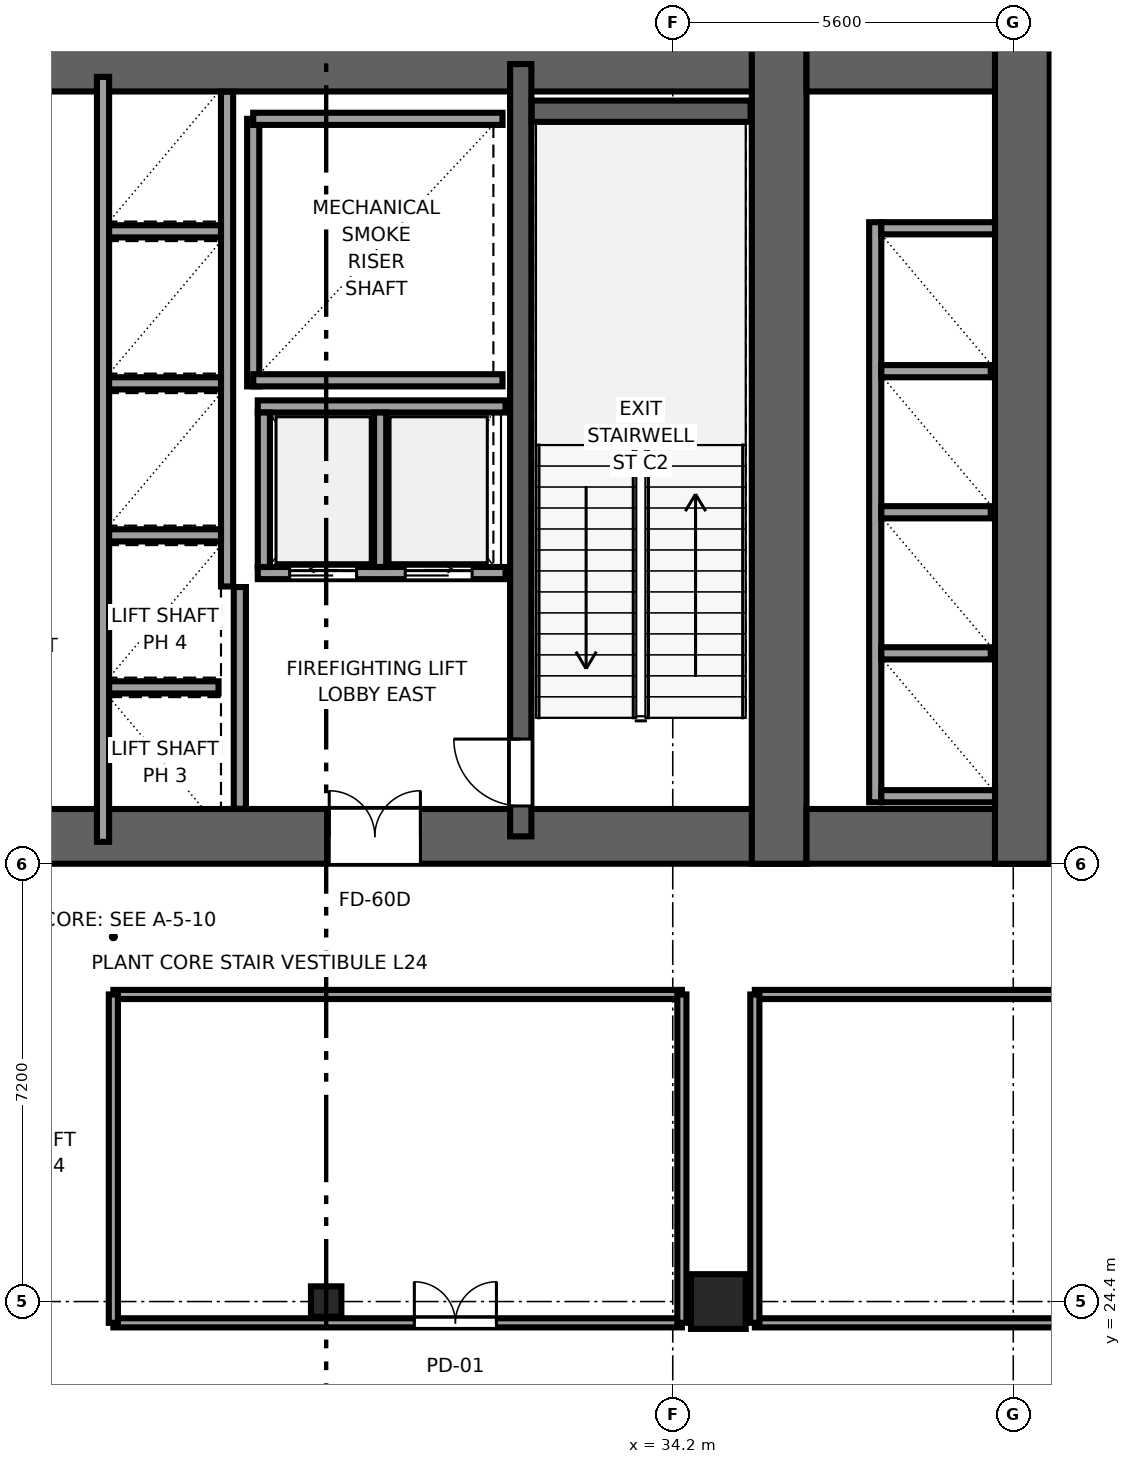
"""IFC4 building model, lengths in metres.
Left out: names, types, materials, properties, quantities, classifications, styles, units other than length and angle.
Written with IfcOpenShell. Run it as: python <this file> out.ifc"""

import sys

from ifc_helpers import new_model, si_unit, direction, frame, frame_2d, origin, origin_2d, place, context, subcontext, project, spatial, rectangle, i_section, extrude, source, transform, mapped, element, fill, save


model = new_model("IFC4")
c1 = context("Model", 3, precision=1e-05, world=origin(), true_north=direction((0.0, 1.0)))
c2 = subcontext(c1, "Body", "Model", "MODEL_VIEW")
j1 = project(units=[si_unit("LENGTHUNIT", "METRE"), si_unit("PLANEANGLEUNIT", "RADIAN")], contexts=[c1])
p1 = place(None, origin())
s1 = spatial("IfcSite", under=j1, at=p1, CompositionType="ELEMENT")
p2 = place(p1, origin())
s2 = spatial("IfcBuilding", under=s1, at=p2, CompositionType="ELEMENT")
p3 = place(p2, frame((0.0, 0.0, 95.9)))
s3 = spatial("IfcBuildingStorey", under=s2, at=p3, CompositionType="ELEMENT", Elevation=95.9)
p4 = place(p3, frame((9.6, 32.05, 0.0), z_axis=(0.0, 0.0, 1.0), x_axis=(1.0, 0.0, 0.0)))
e1 = element("IfcWall", 1, at=p4, inside=s3, PredefinedType="SHEAR", context=c2, shape_type="SweptSolid", body=[
    extrude(rectangle(XDim=26.8, YDim=0.9, at=frame_2d((13.4, 0.0))), origin(), (0.0, 0.0, 1.0), 5.0),
])
p5 = place(p4, frame((7.85, 0.0, 0.0), z_axis=(0.0, 0.0, 1.0), x_axis=(-1.0, 0.0, 0.0)))
e2 = element("IfcOpeningElement", 2, at=p5, cuts=e1, PredefinedType="OPENING", context=c2, shape_type="SweptSolid", body=[
    extrude(rectangle(XDim=1.5, YDim=2.04, at=frame_2d((0.75, 1.02))), frame((0.0, 0.46, 0.0), z_axis=(0.0, -1.0, 0.0), x_axis=(1.0, 0.0, 0.0)), (0.0, 0.0, 1.0), 0.92),
])
p6 = place(p4, frame((14.15, 0.0, 0.0), z_axis=(0.0, 0.0, 1.0), x_axis=(-1.0, 0.0, 0.0)))
e3 = element("IfcOpeningElement", 3, at=p6, cuts=e1, PredefinedType="OPENING", context=c2, shape_type="SweptSolid", body=[
    extrude(rectangle(XDim=1.5, YDim=2.04, at=frame_2d((0.75, 1.02))), frame((0.0, 0.46, 0.0), z_axis=(0.0, -1.0, 0.0), x_axis=(1.0, 0.0, 0.0)), (0.0, 0.0, 1.0), 0.92),
])
p7 = place(p4, frame((20.45, 0.0, 0.0), z_axis=(0.0, 0.0, 1.0), x_axis=(-1.0, 0.0, 0.0)))
e4 = element("IfcOpeningElement", 4, at=p7, cuts=e1, PredefinedType="OPENING", context=c2, shape_type="SweptSolid", body=[
    extrude(rectangle(XDim=1.5, YDim=2.04, at=frame_2d((0.75, 1.02))), frame((0.0, 0.46, 0.0), z_axis=(0.0, -1.0, 0.0), x_axis=(1.0, 0.0, 0.0)), (0.0, 0.0, 1.0), 0.92),
])
p8 = place(p3, frame((9.6, 44.75, 0.0), z_axis=(0.0, 0.0, 1.0), x_axis=(1.0, 0.0, 0.0)))
e5 = element("IfcWall", 5, at=p8, inside=s3, PredefinedType="SHEAR", context=c2, shape_type="SweptSolid", body=[
    extrude(rectangle(XDim=26.8, YDim=0.9, at=frame_2d((13.4, 0.0))), origin(), (0.0, 0.0, 1.0), 5.0),
])
p9 = place(p3, frame((35.95, 31.6, 0.0), z_axis=(0.0, 0.0, 1.0), x_axis=(0.0, 1.0, 0.0)))
e6 = element("IfcWall", 6, at=p9, inside=s3, PredefinedType="SHEAR", context=c2, shape_type="SweptSolid", body=[
    extrude(rectangle(XDim=13.6, YDim=0.9, at=frame_2d((6.8, 0.0))), origin(), (0.0, 0.0, 1.0), 5.0),
])
p10 = place(p3, frame((31.7, 32.05, 0.0), z_axis=(0.0, 0.0, 1.0), x_axis=(0.0, 1.0, 0.0)))
e7 = element("IfcWall", 7, at=p10, inside=s3, PredefinedType="SHEAR", context=c2, shape_type="SweptSolid", body=[
    extrude(rectangle(XDim=12.7, YDim=0.35, at=frame_2d((6.35, 0.0))), origin(), (0.0, 0.0, 1.0), 5.0),
])
p11 = place(p10, frame((1.6, 0.0, 0.0), z_axis=(0.0, 0.0, 1.0), x_axis=(-1.0, 0.0, 0.0)))
e8 = element("IfcOpeningElement", 8, at=p11, cuts=e7, PredefinedType="OPENING", context=c2, shape_type="SweptSolid", body=[
    extrude(rectangle(XDim=1.1, YDim=2.12, at=frame_2d((0.55, 1.06))), frame((0.0, 0.185, 0.0), z_axis=(0.0, -1.0, 0.0), x_axis=(1.0, 0.0, 0.0)), (0.0, 0.0, 1.0), 0.37),
])
for number, where, z_axis, x_axis in (
    (9, (36.4, 32.05, 0.0), (0.0, 0.0, 1.0), (1.0, 0.0, 0.0)),
    (10, (36.4, 44.75, 0.0), (0.0, 0.0, 1.0), (1.0, 0.0, 0.0)),
):
    element("IfcWall", number, at=place(p3, frame(where, z_axis=z_axis, x_axis=x_axis)), inside=s3, PredefinedType="SHEAR", context=c2, shape_type="SweptSolid", body=[
        extrude(rectangle(XDim=4.0, YDim=0.9, at=frame_2d((2.0, 0.0))), origin(), (0.0, 0.0, 1.0), 5.0),
    ])
p12 = place(p3, frame((39.95, 31.6, 0.0), z_axis=(0.0, 0.0, 1.0), x_axis=(0.0, 1.0, 0.0)))
e11 = element("IfcWall", 11, at=p12, inside=s3, PredefinedType="SHEAR", context=c2, shape_type="SweptSolid", body=[
    extrude(rectangle(XDim=13.6, YDim=0.9, at=frame_2d((6.8, 0.0))), origin(), (0.0, 0.0, 1.0), 5.0),
])
p13 = place(p3, frame((31.88, 43.975, 0.0), z_axis=(0.0, 0.0, 1.0), x_axis=(1.0, 0.0, 0.0)))
e12 = element("IfcWall", 12, at=p13, inside=s3, PredefinedType="SHEAR", context=c2, shape_type="SweptSolid", body=[
    extrude(rectangle(XDim=3.6, YDim=0.35, at=frame_2d((1.8, 0.0))), origin(), (0.0, 0.0, 1.0), 5.0),
])
m1 = source(origin(), c2, "Body", "SweptSolid", [
    extrude(rectangle(XDim=0.9, YDim=0.9, at=origin_2d()), origin(), (0.0, 0.0, 1.0), 5.0),
])
p14 = place(p3, frame((34.95, 24.4, 0.0), z_axis=(0.0, 0.0, 1.0), x_axis=(1.0, 0.0, 0.0)))
e13 = element("IfcColumn", 13, at=p14, inside=s3, PredefinedType="COLUMN", context=c2, shape_type="MappedRepresentation", body=[
    mapped(m1, transform((0.0, 0.0, 0.0), x_axis=(1.0, 0.0, 0.0), y_axis=(0.0, 1.0, 0.0), z_axis=(0.0, 0.0, 1.0), scale=1.0)),
])
m2 = source(origin(), c2, "Body", "SweptSolid", [
    extrude(i_section(OverallWidth=0.5, OverallDepth=0.5, WebThickness=0.022, FlangeThickness=0.034, at=origin_2d()), origin(), (0.0, 0.0, 1.0), 5.0),
])
p15 = place(p3, frame((28.5, 24.4, 0.0), z_axis=(0.0, 0.0, 1.0), x_axis=(1.0, 0.0, 0.0)))
e14 = element("IfcColumn", 14, at=p15, inside=s3, PredefinedType="COLUMN", context=c2, shape_type="MappedRepresentation", body=[
    mapped(m2, transform((0.0, 0.0, 0.0), x_axis=(1.0, 0.0, 0.0), y_axis=(0.0, 1.0, 0.0), z_axis=(0.0, 0.0, 1.0), scale=1.0)),
])
p16 = place(p3, frame((27.3, 39.45, 0.0), z_axis=(0.0, 0.0, 1.0), x_axis=(0.0, 1.0, 0.0)))
e15 = element("IfcWall", 15, at=p16, inside=s3, PredefinedType="SOLIDWALL", context=c2, shape_type="SweptSolid", body=[
    extrude(rectangle(XDim=4.4, YDim=0.2, at=frame_2d((2.2, 0.0))), origin(), (0.0, 0.0, 1.0), 4.82),
])
for number, where, z_axis, x_axis in (
    (16, (27.3, 39.55, 0.0), (0.0, 0.0, 1.0), (1.0, 0.0, 0.0)),
    (17, (27.3, 43.85, 0.0), (0.0, 0.0, 1.0), (1.0, 0.0, 0.0)),
):
    element("IfcWall", number, at=place(p3, frame(where, z_axis=z_axis, x_axis=x_axis)), inside=s3, PredefinedType="SOLIDWALL", context=c2, shape_type="SweptSolid", body=[
        extrude(rectangle(XDim=4.1, YDim=0.2, at=frame_2d((2.05, 0.0))), origin(), (0.0, 0.0, 1.0), 4.82),
    ])
p17 = place(p3, frame((27.08, 32.504, 0.0), z_axis=(0.0, 0.0, 1.0), x_axis=(0.0, 1.0, 0.0)))
e18 = element("IfcWall", 18, at=p17, inside=s3, PredefinedType="SOLIDWALL", context=c2, shape_type="SweptSolid", body=[
    extrude(rectangle(XDim=3.646, YDim=0.2, at=frame_2d((1.823, 0.0))), origin(), (0.0, 0.0, 1.0), 4.82),
])
p18 = place(p3, frame((27.375, 36.38, 0.0), z_axis=(0.0, 0.0, 1.0), x_axis=(1.0, 0.0, 0.0)))
e19 = element("IfcWall", 19, at=p18, inside=s3, PredefinedType="SOLIDWALL", context=c2, shape_type="SweptSolid", body=[
    extrude(rectangle(XDim=4.075, YDim=0.2, at=frame_2d((2.038, 0.0))), origin(), (0.0, 0.0, 1.0), 4.82),
])
p19 = place(p18, frame((0.525, 0.0, 0.0)))
e20 = element("IfcOpeningElement", 20, at=p19, cuts=e19, PredefinedType="OPENING", context=c2, shape_type="SweptSolid", body=[
    extrude(rectangle(XDim=1.1, YDim=2.12, at=frame_2d((0.55, 1.06))), frame((0.0, 0.11, 0.0), z_axis=(0.0, -1.0, 0.0), x_axis=(1.0, 0.0, 0.0)), (0.0, 0.0, 1.0), 0.22),
])
p20 = place(p18, frame((2.425, 0.0, 0.0)))
e21 = element("IfcOpeningElement", 21, at=p20, cuts=e19, PredefinedType="OPENING", context=c2, shape_type="SweptSolid", body=[
    extrude(rectangle(XDim=1.1, YDim=2.12, at=frame_2d((0.55, 1.06))), frame((0.0, 0.11, 0.0), z_axis=(0.0, -1.0, 0.0), x_axis=(1.0, 0.0, 0.0)), (0.0, 0.0, 1.0), 0.22),
])
p21 = place(p3, frame((27.375, 39.12, 0.0), z_axis=(0.0, 0.0, 1.0), x_axis=(1.0, 0.0, 0.0)))
e22 = element("IfcWall", 22, at=p21, inside=s3, PredefinedType="SOLIDWALL", context=c2, shape_type="SweptSolid", body=[
    extrude(rectangle(XDim=4.075, YDim=0.2, at=frame_2d((2.038, 0.0))), origin(), (0.0, 0.0, 1.0), 4.82),
])
for number, where, z_axis, x_axis in (
    (23, (27.475, 36.48, 0.0), (0.0, 0.0, 1.0), (0.0, 1.0, 0.0)),
    (24, (29.387, 36.48, 0.0), (0.0, 0.0, 1.0), (0.0, 1.0, 0.0)),
):
    element("IfcWall", number, at=place(p3, frame(where, z_axis=z_axis, x_axis=x_axis)), inside=s3, PredefinedType="SOLIDWALL", context=c2, shape_type="SweptSolid", body=[
        extrude(rectangle(XDim=2.54, YDim=0.2, at=frame_2d((1.27, 0.0))), origin(), (0.0, 0.0, 1.0), 4.82),
    ])
p22 = place(p3, frame((24.83, 31.96, 0.0), z_axis=(0.0, 0.0, 1.0), x_axis=(0.0, 1.0, 0.0)))
e25 = element("IfcWall", 25, at=p22, inside=s3, PredefinedType="SOLIDWALL", context=c2, shape_type="SweptSolid", body=[
    extrude(rectangle(XDim=12.58, YDim=0.2, at=frame_2d((6.29, 0.0))), origin(), (0.0, 0.0, 1.0), 4.82),
])
p23 = place(p3, frame((26.87, 36.16, 0.0), z_axis=(0.0, 0.0, 1.0), x_axis=(0.0, 1.0, 0.0)))
e26 = element("IfcWall", 26, at=p23, inside=s3, PredefinedType="SOLIDWALL", context=c2, shape_type="SweptSolid", body=[
    extrude(rectangle(XDim=8.136, YDim=0.2, at=frame_2d((4.068, 0.0))), origin(), (0.0, 0.0, 1.0), 4.82),
])
p24 = place(p3, frame((24.93, 34.5, 0.0), z_axis=(0.0, 0.0, 1.0), x_axis=(1.0, 0.0, 0.0)))
e27 = element("IfcWall", 27, at=p24, inside=s3, PredefinedType="SOLIDWALL", context=c2, shape_type="SweptSolid", body=[
    extrude(rectangle(XDim=1.8, YDim=0.2, at=frame_2d((0.9, 0.0))), origin(), (0.0, 0.0, 1.0), 4.82),
])
for number, where, z_axis, x_axis in (
    (28, (24.93, 37.0, 0.0), (0.0, 0.0, 1.0), (1.0, 0.0, 0.0)),
    (29, (24.93, 39.5, 0.0), (0.0, 0.0, 1.0), (1.0, 0.0, 0.0)),
    (30, (24.93, 42.0, 0.0), (0.0, 0.0, 1.0), (1.0, 0.0, 0.0)),
):
    element("IfcWall", number, at=place(p3, frame(where, z_axis=z_axis, x_axis=x_axis)), inside=s3, PredefinedType="SOLIDWALL", context=c2, shape_type="SweptSolid", body=[
        extrude(rectangle(XDim=1.84, YDim=0.2, at=frame_2d((0.92, 0.0))), origin(), (0.0, 0.0, 1.0), 4.82),
    ])
p25 = place(p3, frame((37.53, 32.61, 0.0), z_axis=(0.0, 0.0, 1.0), x_axis=(0.0, 1.0, 0.0)))
e31 = element("IfcWall", 31, at=p25, inside=s3, PredefinedType="SOLIDWALL", context=c2, shape_type="SweptSolid", body=[
    extrude(rectangle(XDim=9.54, YDim=0.2, at=frame_2d((4.77, 0.0))), origin(), (0.0, 0.0, 1.0), 4.82),
])
for number, where, z_axis, x_axis in (
    (32, (37.63, 32.71, 0.0), (0.0, 0.0, 1.0), (1.0, 0.0, 0.0)),
    (33, (37.63, 42.05, 0.0), (0.0, 0.0, 1.0), (1.0, 0.0, 0.0)),
):
    element("IfcWall", number, at=place(p3, frame(where, z_axis=z_axis, x_axis=x_axis)), inside=s3, PredefinedType="SOLIDWALL", context=c2, shape_type="SweptSolid", body=[
        extrude(rectangle(XDim=1.87, YDim=0.2, at=frame_2d((0.935, 0.0))), origin(), (0.0, 0.0, 1.0), 4.82),
    ])
for number, where, z_axis, x_axis in (
    (34, (37.63, 35.06, 0.0), (0.0, 0.0, 1.0), (1.0, 0.0, 0.0)),
    (35, (37.63, 37.38, 0.0), (0.0, 0.0, 1.0), (1.0, 0.0, 0.0)),
    (36, (37.63, 39.7, 0.0), (0.0, 0.0, 1.0), (1.0, 0.0, 0.0)),
):
    element("IfcWall", number, at=place(p3, frame(where, z_axis=z_axis, x_axis=x_axis)), inside=s3, PredefinedType="SOLIDWALL", context=c2, shape_type="SweptSolid", body=[
        extrude(rectangle(XDim=1.8, YDim=0.2, at=frame_2d((0.9, 0.0))), origin(), (0.0, 0.0, 1.0), 4.82),
    ])
p26 = place(p3, frame((25.0, 24.05, 0.0), z_axis=(0.0, 0.0, 1.0), x_axis=(1.0, 0.0, 0.0)))
e37 = element("IfcWall", 37, at=p26, inside=s3, PredefinedType="PARTITIONING", context=c2, shape_type="SweptSolid", body=[
    extrude(rectangle(XDim=9.35, YDim=0.15, at=frame_2d((4.675, 0.0))), origin(), (0.0, 0.0, 1.0), 4.82),
])
p27 = place(p26, frame((4.95, 0.0, 0.0)))
e38 = element("IfcOpeningElement", 38, at=p27, cuts=e37, PredefinedType="OPENING", context=c2, shape_type="SweptSolid", body=[
    extrude(rectangle(XDim=1.35, YDim=2.15, at=frame_2d((0.675, 1.075))), frame((0.0, 0.085, 0.0), z_axis=(0.0, -1.0, 0.0), x_axis=(1.0, 0.0, 0.0)), (0.0, 0.0, 1.0), 0.17),
])
p28 = place(p3, frame((25.0, 29.45, 0.0), z_axis=(0.0, 0.0, 1.0), x_axis=(1.0, 0.0, 0.0)))
e39 = element("IfcWall", 39, at=p28, inside=s3, PredefinedType="PARTITIONING", context=c2, shape_type="SweptSolid", body=[
    extrude(rectangle(XDim=9.35, YDim=0.15, at=frame_2d((4.675, 0.0))), origin(), (0.0, 0.0, 1.0), 4.82),
])
for number, where, z_axis, x_axis in (
    (40, (25.0, 24.05, 0.0), (0.0, 0.0, 1.0), (0.0, 1.0, 0.0)),
    (41, (34.35, 24.05, 0.0), (0.0, 0.0, 1.0), (0.0, 1.0, 0.0)),
):
    element("IfcWall", number, at=place(p3, frame(where, z_axis=z_axis, x_axis=x_axis)), inside=s3, PredefinedType="PARTITIONING", context=c2, shape_type="SweptSolid", body=[
        extrude(rectangle(XDim=5.4, YDim=0.15, at=frame_2d((2.7, 0.0))), origin(), (0.0, 0.0, 1.0), 4.82),
    ])
p29 = place(p3, frame((35.55, 24.05, 0.0), z_axis=(0.0, 0.0, 1.0), x_axis=(1.0, 0.0, 0.0)))
e42 = element("IfcWall", 42, at=p29, inside=s3, PredefinedType="PARTITIONING", context=c2, shape_type="SweptSolid", body=[
    extrude(rectangle(XDim=20.05, YDim=0.15, at=frame_2d((10.025, 0.0))), origin(), (0.0, 0.0, 1.0), 4.82),
])
p30 = place(p29, frame((9.35, 0.0, 0.0)))
e43 = element("IfcOpeningElement", 43, at=p30, cuts=e42, PredefinedType="OPENING", context=c2, shape_type="SweptSolid", body=[
    extrude(rectangle(XDim=1.35, YDim=2.15, at=frame_2d((0.675, 1.075))), frame((0.0, 0.085, 0.0), z_axis=(0.0, -1.0, 0.0), x_axis=(1.0, 0.0, 0.0)), (0.0, 0.0, 1.0), 0.17),
])
p31 = place(p3, frame((35.55, 29.45, 0.0), z_axis=(0.0, 0.0, 1.0), x_axis=(1.0, 0.0, 0.0)))
e44 = element("IfcWall", 44, at=p31, inside=s3, PredefinedType="PARTITIONING", context=c2, shape_type="SweptSolid", body=[
    extrude(rectangle(XDim=20.05, YDim=0.15, at=frame_2d((10.025, 0.0))), origin(), (0.0, 0.0, 1.0), 4.82),
])
p32 = place(p3, frame((35.55, 24.05, 0.0), z_axis=(0.0, 0.0, 1.0), x_axis=(0.0, 1.0, 0.0)))
e45 = element("IfcWall", 45, at=p32, inside=s3, PredefinedType="PARTITIONING", context=c2, shape_type="SweptSolid", body=[
    extrude(rectangle(XDim=5.4, YDim=0.15, at=frame_2d((2.7, 0.0))), origin(), (0.0, 0.0, 1.0), 4.82),
])
m3 = source(origin(), c2, "Body", "SweptSolid", [
    extrude(rectangle(XDim=1.1, YDim=2.12, at=frame_2d((0.55, 1.06))), frame((0.0, 0.025, 0.0), z_axis=(0.0, -1.0, 0.0), x_axis=(1.0, 0.0, 0.0)), (0.0, 0.0, 1.0), 0.05),
])
p33 = place(p11, origin())
e46 = element("IfcDoor", 46, at=p33, inside=s3, OperationType="SINGLE_SWING_RIGHT", PredefinedType="DOOR", context=c2, shape_type="MappedRepresentation", body=[
    mapped(m3, transform((0.0, 0.0, 0.0), x_axis=(1.0, 0.0, 0.0), y_axis=(0.0, 1.0, 0.0), z_axis=(0.0, 0.0, 1.0), scale=1.0)),
])
fill(e8, e46)
m4 = source(origin(), c2, "Body", "SweptSolid", [
    extrude(rectangle(XDim=1.5, YDim=2.04, at=frame_2d((0.75, 1.02))), frame((0.0, 0.025, 0.0), z_axis=(0.0, -1.0, 0.0), x_axis=(1.0, 0.0, 0.0)), (0.0, 0.0, 1.0), 0.05),
])
p34 = place(p7, origin())
e47 = element("IfcDoor", 47, at=p34, inside=s3, OperationType="DOUBLE_DOOR_SINGLE_SWING", PredefinedType="DOOR", context=c2, shape_type="MappedRepresentation", body=[
    mapped(m4, transform((0.0, 0.0, 0.0), x_axis=(1.0, 0.0, 0.0), y_axis=(0.0, 1.0, 0.0), z_axis=(0.0, 0.0, 1.0), scale=1.0)),
])
fill(e4, e47)
m5 = source(origin(), c2, "Body", "SweptSolid", [
    extrude(rectangle(XDim=1.1, YDim=2.12, at=frame_2d((0.55, 1.06))), frame((0.0, 0.025, 0.0), z_axis=(0.0, -1.0, 0.0), x_axis=(1.0, 0.0, 0.0)), (0.0, 0.0, 1.0), 0.05),
])
p35 = place(p19, origin())
e48 = element("IfcDoor", 48, at=p35, inside=s3, OperationType="SLIDING_TO_LEFT", PredefinedType="DOOR", context=c2, shape_type="MappedRepresentation", body=[
    mapped(m5, transform((0.0, 0.0, 0.0), x_axis=(1.0, 0.0, 0.0), y_axis=(0.0, 1.0, 0.0), z_axis=(0.0, 0.0, 1.0), scale=1.0)),
])
fill(e20, e48)
p36 = place(p20, origin())
e49 = element("IfcDoor", 49, at=p36, inside=s3, OperationType="SLIDING_TO_RIGHT", PredefinedType="DOOR", context=c2, shape_type="MappedRepresentation", body=[
    mapped(m5, transform((0.0, 0.0, 0.0), x_axis=(1.0, 0.0, 0.0), y_axis=(0.0, 1.0, 0.0), z_axis=(0.0, 0.0, 1.0), scale=1.0)),
])
fill(e21, e49)
m6 = source(origin(), c2, "Body", "SweptSolid", [
    extrude(rectangle(XDim=1.35, YDim=2.15, at=frame_2d((0.675, 1.075))), frame((0.0, 0.025, 0.0), z_axis=(0.0, -1.0, 0.0), x_axis=(1.0, 0.0, 0.0)), (0.0, 0.0, 1.0), 0.05),
])
p37 = place(p27, origin())
e50 = element("IfcDoor", 50, at=p37, inside=s3, OperationType="DOUBLE_DOOR_SINGLE_SWING", PredefinedType="DOOR", context=c2, shape_type="MappedRepresentation", body=[
    mapped(m6, transform((0.0, 0.0, 0.0), x_axis=(1.0, 0.0, 0.0), y_axis=(0.0, 1.0, 0.0), z_axis=(0.0, 0.0, 1.0), scale=1.0)),
])
fill(e38, e50)
save(model, sys.argv[1])
